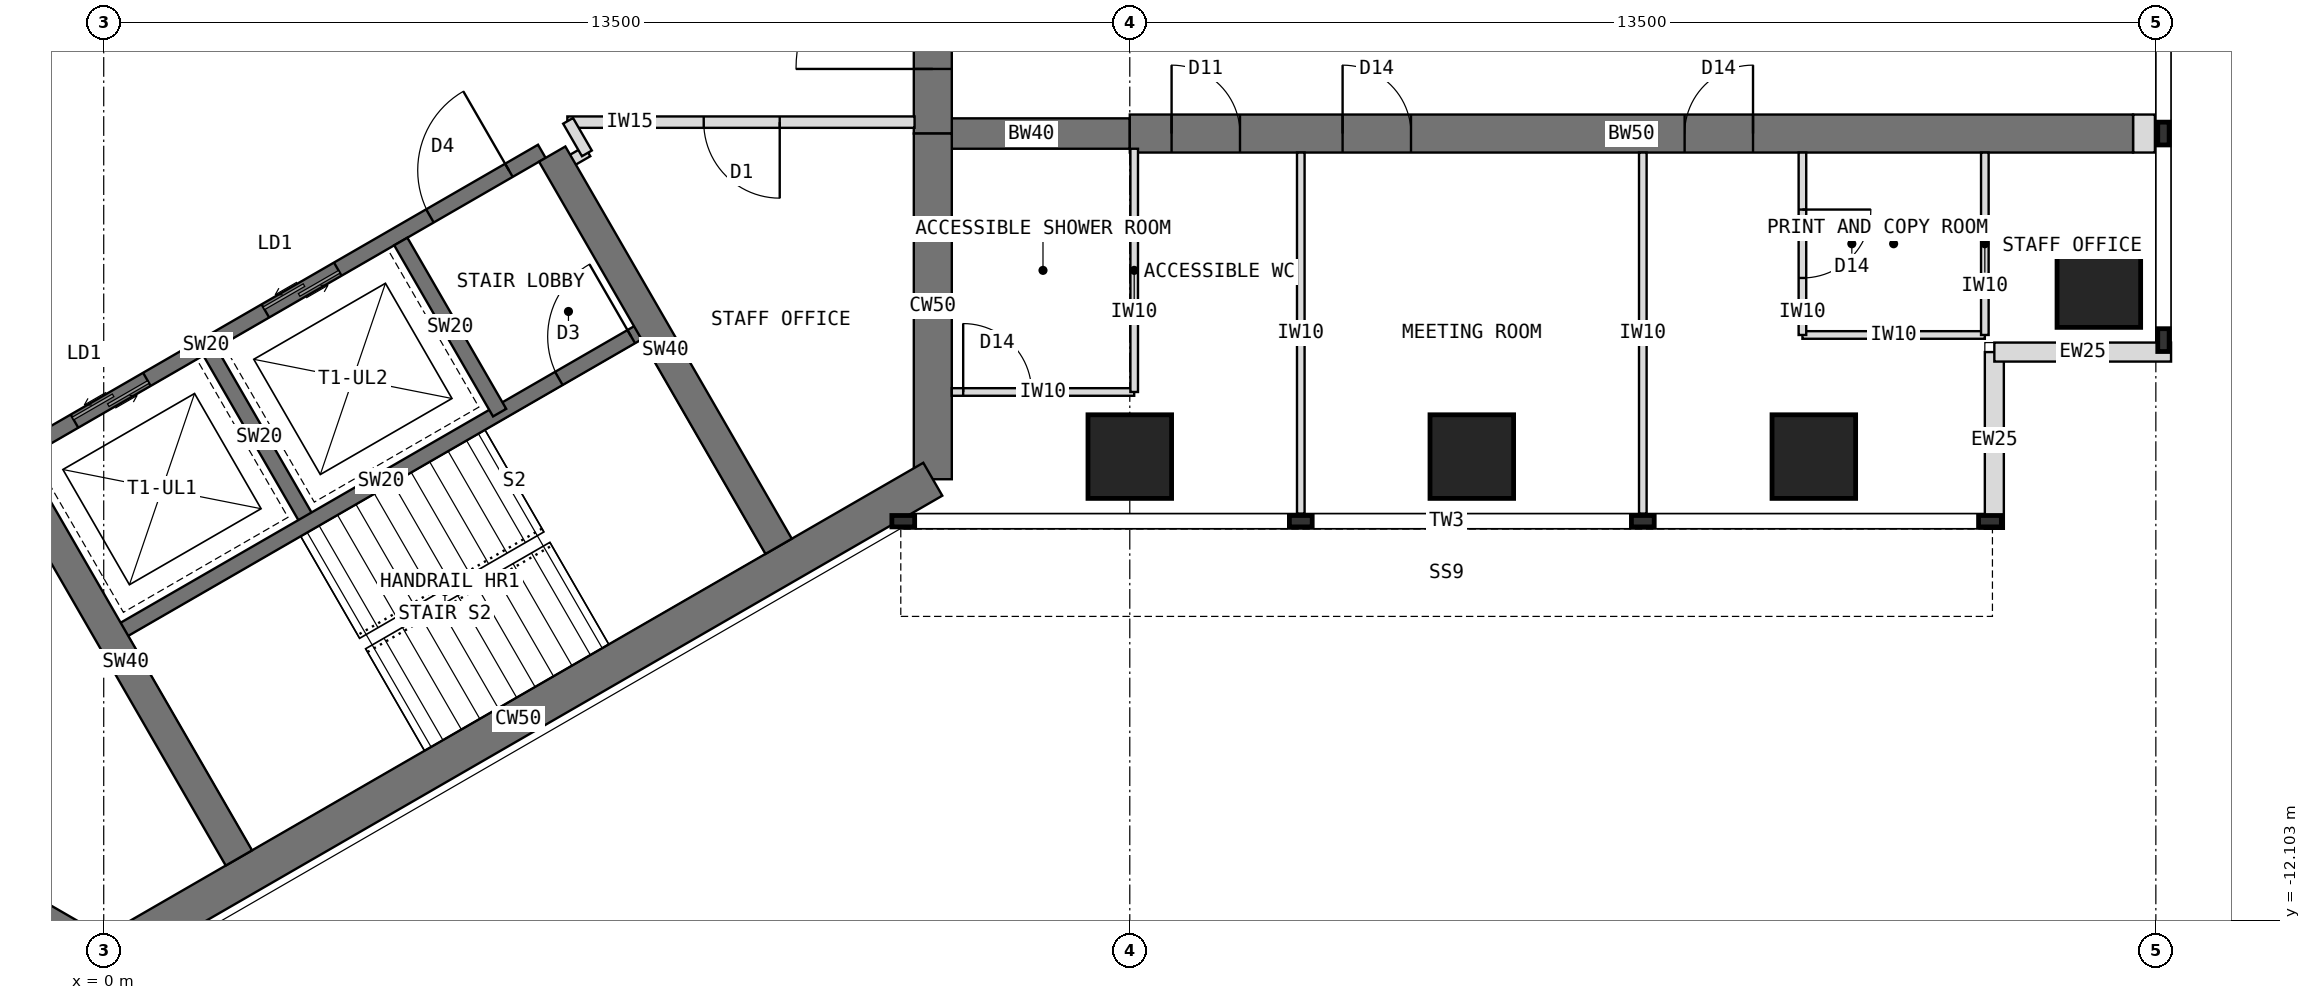
"""IFC4 building model, lengths in metres.
Left out: names, types, materials, properties, quantities, classifications, styles, units other than length and angle.
Written with IfcOpenShell. Run it as: python <this file> out.ifc"""

import sys

from ifc_helpers import new_model, si_unit, direction, frame, frame_2d, origin, origin_2d, place, context, subcontext, project, spatial, rectangle, extrude, element, fill, save


model = new_model("IFC4")
c1 = context("Model", 3, precision=1e-05, world=origin(), true_north=direction((0.0, 1.0)))
c2 = subcontext(c1, "Body", "Model", "MODEL_VIEW")
j1 = project(units=[si_unit("LENGTHUNIT", "METRE"), si_unit("PLANEANGLEUNIT", "RADIAN")], contexts=[c1])
p1 = place(None, origin())
s1 = spatial("IfcSite", under=j1, at=p1, CompositionType="ELEMENT")
p2 = place(p1, origin())
s2 = spatial("IfcBuilding", under=s1, at=p2, CompositionType="ELEMENT")
p3 = place(p2, frame((0.0, 0.0, 218.5)))
s3 = spatial("IfcBuildingStorey", under=s2, at=p3, CompositionType="ELEMENT", Elevation=218.5)
p4 = place(p3, frame((10.908, -6.298, 0.0), z_axis=(0.0, 0.0, 1.0), x_axis=(0.0, 1.0, 0.0)))
e1 = element("IfcWall", 1, at=p4, inside=s3, PredefinedType="SHEAR", context=c2, shape_type="SweptSolid", body=[
    extrude(rectangle(XDim=4.548, YDim=0.5, at=frame_2d((2.274, 0.0))), origin(), (0.0, 0.0, 1.0), 4.0),
])
p5 = place(p3, frame((10.908, -1.75, 0.0), z_axis=(0.0, 0.0, 1.0), x_axis=(0.0, 1.0, 0.0)))
e2 = element("IfcWall", 2, at=p5, inside=s3, PredefinedType="SHEAR", context=c2, shape_type="SweptSolid", body=[
    extrude(rectangle(XDim=3.5, YDim=0.5, at=frame_2d((1.75, 0.0))), origin(), (0.0, 0.0, 1.0), 4.0),
])
p6 = place(p5, frame((0.85, 0.0, 0.0)))
e3 = element("IfcOpeningElement", 3, at=p6, cuts=e2, PredefinedType="OPENING", context=c2, shape_type="SweptSolid", body=[
    extrude(rectangle(XDim=1.8, YDim=2.1, at=frame_2d((0.9, 1.05))), frame((0.0, 0.26, 0.0), z_axis=(0.0, -1.0, 0.0), x_axis=(1.0, 0.0, 0.0)), (0.0, 0.0, 1.0), 0.52),
])
p7 = place(p3, frame((-3.939, -10.322, 0.0), z_axis=(0.0, 0.0, 1.0), x_axis=(0.866011268655, -0.500024481964, 0.0)))
e4 = element("IfcWall", 4, at=p7, inside=s3, PredefinedType="SHEAR", context=c2, shape_type="SweptSolid", body=[
    extrude(rectangle(XDim=4.548, YDim=0.5, at=frame_2d((2.274, 0.0))), origin(), (0.0, 0.0, 1.0), 4.0),
])
p8 = place(p3, frame((0.0, -12.596, 0.0), z_axis=(0.0, 0.0, 1.0), x_axis=(0.866021940709, 0.500005998175, 0.0)))
e5 = element("IfcWall", 5, at=p8, inside=s3, PredefinedType="SHEAR", context=c2, shape_type="SweptSolid", body=[
    extrude(rectangle(XDim=12.596, YDim=0.5, at=frame_2d((6.298, 0.0))), origin(), (0.0, 0.0, 1.0), 4.0),
])
p9 = place(p3, frame((10.908, -1.75, 0.0), z_axis=(0.0, 0.0, 1.0), x_axis=(1.0, 0.0, 0.0)))
e6 = element("IfcWall", 6, at=p9, inside=s3, PredefinedType="SHEAR", context=c2, shape_type="SweptSolid", body=[
    extrude(rectangle(XDim=2.592, YDim=0.4, at=frame_2d((1.296, 0.0))), origin(), (0.0, 0.0, 1.0), 4.0),
])
p10 = place(p3, frame((13.5, -1.75, 0.0), z_axis=(0.0, 0.0, 1.0), x_axis=(1.0, 0.0, 0.0)))
e7 = element("IfcWall", 7, at=p10, inside=s3, PredefinedType="SHEAR", context=c2, shape_type="SweptSolid", body=[
    extrude(rectangle(XDim=13.2, YDim=0.5, at=frame_2d((6.6, 0.0))), origin(), (0.0, 0.0, 1.0), 4.0),
])
p11 = place(p10, frame((0.55, 0.0, 0.0)))
e8 = element("IfcOpeningElement", 8, at=p11, cuts=e7, PredefinedType="OPENING", context=c2, shape_type="SweptSolid", body=[
    extrude(rectangle(XDim=0.9, YDim=2.1, at=frame_2d((0.45, 1.05))), frame((0.0, 0.26, 0.0), z_axis=(0.0, -1.0, 0.0), x_axis=(1.0, 0.0, 0.0)), (0.0, 0.0, 1.0), 0.52),
])
p12 = place(p10, frame((2.8, 0.0, 0.0)))
e9 = element("IfcOpeningElement", 9, at=p12, cuts=e7, PredefinedType="OPENING", context=c2, shape_type="SweptSolid", body=[
    extrude(rectangle(XDim=0.9, YDim=2.1, at=frame_2d((0.45, 1.05))), frame((0.0, 0.26, 0.0), z_axis=(0.0, -1.0, 0.0), x_axis=(1.0, 0.0, 0.0)), (0.0, 0.0, 1.0), 0.52),
])
p13 = place(p10, frame((7.3, 0.0, 0.0)))
e10 = element("IfcOpeningElement", 10, at=p13, cuts=e7, PredefinedType="OPENING", context=c2, shape_type="SweptSolid", body=[
    extrude(rectangle(XDim=0.9, YDim=2.1, at=frame_2d((0.45, 1.05))), frame((0.0, 0.26, 0.0), z_axis=(0.0, -1.0, 0.0), x_axis=(1.0, 0.0, 0.0)), (0.0, 0.0, 1.0), 0.52),
])
for number, where, z_axis, x_axis in (
    (11, (13.5, -6.0, 0.0), (0.0, 0.0, 1.0), (1.0, 0.0, 0.0)),
    (12, (18.0, -6.0, 0.0), (0.0, 0.0, 1.0), (1.0, 0.0, 0.0)),
    (13, (22.5, -6.0, 0.0), (0.0, 0.0, 1.0), (1.0, 0.0, 0.0)),
    (14, (26.25, -3.75, 0.0), (0.0, 0.0, 1.0), (1.0, 0.0, 0.0)),
):
    element("IfcColumn", number, at=place(p3, frame(where, z_axis=z_axis, x_axis=x_axis)), inside=s3, PredefinedType="COLUMN", context=c2, shape_type="SweptSolid", body=[
        extrude(rectangle(XDim=1.1, YDim=1.1, at=origin_2d()), origin(), (0.0, 0.0, 1.0), 4.0),
    ])
for number, where, z_axis, x_axis in (
    (15, (24.875, -6.95, 0.0), (0.0, 0.0, 1.0), (0.0, 1.0, 0.0)),
    (16, (24.875, -4.625, 0.0), (0.0, 0.0, 1.0), (1.0, 0.0, 0.0)),
):
    element("IfcWall", number, at=place(p3, frame(where, z_axis=z_axis, x_axis=x_axis)), inside=s3, PredefinedType="STANDARD", context=c2, shape_type="SweptSolid", body=[
        extrude(rectangle(XDim=2.325, YDim=0.25, at=frame_2d((1.163, 0.0))), origin(), (0.0, 0.0, 1.0), 3.8),
    ])
p14 = place(p3, frame((26.7, -1.75, 0.0), z_axis=(0.0, 0.0, 1.0), x_axis=(1.0, 0.0, 0.0)))
e17 = element("IfcWall", 17, at=p14, inside=s3, PredefinedType="PARTITIONING", context=c2, shape_type="SweptSolid", body=[
    extrude(rectangle(XDim=0.288, YDim=0.5, at=frame_2d((0.144, 0.0))), origin(), (0.0, 0.0, 1.0), 3.8),
])
p15 = place(p3, frame((-1.164, -5.984, 0.0), z_axis=(0.0, 0.0, 1.0), x_axis=(0.866026010844, 0.49999894854, 0.0)))
e18 = element("IfcWall", 18, at=p15, inside=s3, PredefinedType="SHEAR", context=c2, shape_type="SweptSolid", body=[
    extrude(rectangle(XDim=8.0, YDim=0.2, at=frame_2d((4.0, 0.0))), origin(), (0.0, 0.0, 1.0), 4.0),
])
p16 = place(p15, frame((6.3, 0.0, 0.0)))
e19 = element("IfcOpeningElement", 19, at=p16, cuts=e18, PredefinedType="OPENING", context=c2, shape_type="SweptSolid", body=[
    extrude(rectangle(XDim=1.2, YDim=2.1, at=frame_2d((0.6, 1.05))), frame((0.0, 0.11, 0.0), z_axis=(0.0, -1.0, 0.0), x_axis=(1.0, 0.0, 0.0)), (0.0, 0.0, 1.0), 0.22),
])
p17 = place(p15, frame((0.9, 0.0, 0.0)))
e20 = element("IfcOpeningElement", 20, at=p17, cuts=e18, PredefinedType="OPENING", context=c2, shape_type="SweptSolid", body=[
    extrude(rectangle(XDim=1.1, YDim=2.2, at=frame_2d((0.55, 1.1))), frame((0.0, 0.11, 0.0), z_axis=(0.0, -1.0, 0.0), x_axis=(1.0, 0.0, 0.0)), (0.0, 0.0, 1.0), 0.22),
])
p18 = place(p15, frame((3.8, 0.0, 0.0)))
e21 = element("IfcOpeningElement", 21, at=p18, cuts=e18, PredefinedType="OPENING", context=c2, shape_type="SweptSolid", body=[
    extrude(rectangle(XDim=1.1, YDim=2.2, at=frame_2d((0.55, 1.1))), frame((0.0, 0.11, 0.0), z_axis=(0.0, -1.0, 0.0), x_axis=(1.0, 0.0, 0.0)), (0.0, 0.0, 1.0), 0.22),
])
p19 = place(p3, frame((1.397, -4.62, 0.0), z_axis=(0.0, 0.0, 1.0), x_axis=(0.499936506574, -0.866062058628, 0.0)))
e22 = element("IfcWall", 22, at=p19, inside=s3, PredefinedType="SHEAR", context=c2, shape_type="SweptSolid", body=[
    extrude(rectangle(XDim=2.6, YDim=0.2, at=frame_2d((1.3, 0.0))), origin(), (0.0, 0.0, 1.0), 4.0),
])
p20 = place(p3, frame((3.909, -3.17, 0.0), z_axis=(0.0, 0.0, 1.0), x_axis=(0.49997716683, -0.86603858612, 0.0)))
e23 = element("IfcWall", 23, at=p20, inside=s3, PredefinedType="SHEAR", context=c2, shape_type="SweptSolid", body=[
    extrude(rectangle(XDim=2.6, YDim=0.2, at=frame_2d((1.3, 0.0))), origin(), (0.0, 0.0, 1.0), 4.0),
])
p21 = place(p3, frame((0.186, -8.322, 0.0), z_axis=(0.0, 0.0, 1.0), x_axis=(0.866026010844, 0.49999894854, 0.0)))
e24 = element("IfcWall", 24, at=p21, inside=s3, PredefinedType="SHEAR", context=c2, shape_type="SweptSolid", body=[
    extrude(rectangle(XDim=8.0, YDim=0.2, at=frame_2d((4.0, 0.0))), origin(), (0.0, 0.0, 1.0), 4.0),
])
p22 = place(p21, frame((6.7, 0.0, 0.0)))
e25 = element("IfcOpeningElement", 25, at=p22, cuts=e24, PredefinedType="OPENING", context=c2, shape_type="SweptSolid", body=[
    extrude(rectangle(XDim=1.1, YDim=2.1, at=frame_2d((0.55, 1.05))), frame((0.0, 0.11, 0.0), z_axis=(0.0, -1.0, 0.0), x_axis=(1.0, 0.0, 0.0)), (0.0, 0.0, 1.0), 0.22),
])
p23 = place(p3, frame((5.901, -2.02, 0.0), z_axis=(0.0, 0.0, 1.0), x_axis=(0.500003832394, -0.86602319114, 0.0)))
e26 = element("IfcWall", 26, at=p23, inside=s3, PredefinedType="SHEAR", context=c2, shape_type="SweptSolid", body=[
    extrude(rectangle(XDim=5.958, YDim=0.4, at=frame_2d((2.979, 0.0))), origin(), (0.0, 0.0, 1.0), 4.0),
])
p24 = place(p3, frame((-1.201, -6.12, 0.0), z_axis=(0.0, 0.0, 1.0), x_axis=(0.500021575205, -0.866012946976, 0.0)))
e27 = element("IfcWall", 27, at=p24, inside=s3, PredefinedType="SHEAR", context=c2, shape_type="SweptSolid", body=[
    extrude(rectangle(XDim=5.958, YDim=0.4, at=frame_2d((2.979, 0.0))), origin(), (0.0, 0.0, 1.0), 4.0),
])
for number, where, z_axis, x_axis in (
    (28, (15.75, -2.0, 0.0), (0.0, 0.0, 1.0), (0.0, -1.0, 0.0)),
    (29, (20.25, -2.0, 0.0), (0.0, 0.0, 1.0), (0.0, -1.0, 0.0)),
):
    element("IfcWall", number, at=place(p3, frame(where, z_axis=z_axis, x_axis=x_axis)), inside=s3, PredefinedType="PARTITIONING", context=c2, shape_type="SweptSolid", body=[
        extrude(rectangle(XDim=4.75, YDim=0.1, at=frame_2d((2.375, 0.0))), origin(), (0.0, 0.0, 1.0), 3.8),
    ])
p25 = place(p3, frame((22.35, -4.4, 0.0), z_axis=(0.0, 0.0, 1.0), x_axis=(1.0, 0.0, 0.0)))
e30 = element("IfcWall", 30, at=p25, inside=s3, PredefinedType="PARTITIONING", context=c2, shape_type="SweptSolid", body=[
    extrude(rectangle(XDim=2.4, YDim=0.1, at=frame_2d((1.2, 0.0))), origin(), (0.0, 0.0, 1.0), 3.8),
])
p26 = place(p3, frame((22.35, -2.0, 0.0), z_axis=(0.0, 0.0, 1.0), x_axis=(0.0, -1.0, 0.0)))
e31 = element("IfcWall", 31, at=p26, inside=s3, PredefinedType="PARTITIONING", context=c2, shape_type="SweptSolid", body=[
    extrude(rectangle(XDim=2.4, YDim=0.1, at=frame_2d((1.2, 0.0))), origin(), (0.0, 0.0, 1.0), 3.8),
])
p27 = place(p26, frame((0.75, 0.0, 0.0)))
e32 = element("IfcOpeningElement", 32, at=p27, cuts=e31, PredefinedType="OPENING", context=c2, shape_type="SweptSolid", body=[
    extrude(rectangle(XDim=0.9, YDim=2.1, at=frame_2d((0.45, 1.05))), frame((0.0, 0.06, 0.0), z_axis=(0.0, -1.0, 0.0), x_axis=(1.0, 0.0, 0.0)), (0.0, 0.0, 1.0), 0.12),
])
p28 = place(p3, frame((24.75, -2.0, 0.0), z_axis=(0.0, 0.0, 1.0), x_axis=(0.0, -1.0, 0.0)))
e33 = element("IfcWall", 33, at=p28, inside=s3, PredefinedType="PARTITIONING", context=c2, shape_type="SweptSolid", body=[
    extrude(rectangle(XDim=2.4, YDim=0.1, at=frame_2d((1.2, 0.0))), origin(), (0.0, 0.0, 1.0), 3.8),
])
p29 = place(p3, frame((11.158, -5.15, 0.0), z_axis=(0.0, 0.0, 1.0), x_axis=(1.0, 0.0, 0.0)))
e34 = element("IfcWall", 34, at=p29, inside=s3, PredefinedType="PARTITIONING", context=c2, shape_type="SweptSolid", body=[
    extrude(rectangle(XDim=2.4, YDim=0.1, at=frame_2d((1.2, 0.0))), origin(), (0.0, 0.0, 1.0), 3.8),
])
p30 = place(p29, frame((0.15, 0.0, 0.0)))
e35 = element("IfcOpeningElement", 35, at=p30, cuts=e34, PredefinedType="OPENING", context=c2, shape_type="SweptSolid", body=[
    extrude(rectangle(XDim=0.9, YDim=2.1, at=frame_2d((0.45, 1.05))), frame((0.0, 0.06, 0.0), z_axis=(0.0, -1.0, 0.0), x_axis=(1.0, 0.0, 0.0)), (0.0, 0.0, 1.0), 0.12),
])
p31 = place(p3, frame((13.558, -1.95, 0.0), z_axis=(0.0, 0.0, 1.0), x_axis=(0.0, -1.0, 0.0)))
e36 = element("IfcWall", 36, at=p31, inside=s3, PredefinedType="PARTITIONING", context=c2, shape_type="SweptSolid", body=[
    extrude(rectangle(XDim=3.2, YDim=0.1, at=frame_2d((1.6, 0.0))), origin(), (0.0, 0.0, 1.0), 3.267),
])
p32 = place(p3, frame((6.365, -1.983, 0.0), z_axis=(0.0, 0.0, 1.0), x_axis=(-0.865892400268, -0.500230298122, 0.0)))
e37 = element("IfcWall", 37, at=p32, inside=s3, PredefinedType="PARTITIONING", context=c2, shape_type="SweptSolid", body=[
    extrude(rectangle(XDim=0.43, YDim=0.15, at=frame_2d((0.215, 0.0))), origin(), (0.0, 0.0, 1.0), 3.8),
])
p33 = place(p3, frame((10.668, -1.6, 0.0), z_axis=(0.0, 0.0, 1.0), x_axis=(-1.0, 0.0, 0.0)))
e38 = element("IfcWall", 38, at=p33, inside=s3, PredefinedType="PARTITIONING", context=c2, shape_type="SweptSolid", body=[
    extrude(rectangle(XDim=4.568, YDim=0.15, at=frame_2d((2.284, 0.0))), origin(), (0.0, 0.0, 1.0), 3.8),
])
p34 = place(p33, frame((1.774, 0.0, 0.0)))
e39 = element("IfcOpeningElement", 39, at=p34, cuts=e38, PredefinedType="OPENING", context=c2, shape_type="SweptSolid", body=[
    extrude(rectangle(XDim=1.0, YDim=2.1, at=frame_2d((0.5, 1.05))), frame((0.0, 0.085, 0.0), z_axis=(0.0, -1.0, 0.0), x_axis=(1.0, 0.0, 0.0)), (0.0, 0.0, 1.0), 0.17),
])
p35 = place(p3, frame((6.11, -1.583, 0.0), z_axis=(0.0, 0.0, 1.0), x_axis=(0.50033519877, -0.865831790172, 0.0)))
e40 = element("IfcWall", 40, at=p35, inside=s3, PredefinedType="PARTITIONING", context=c2, shape_type="SweptSolid", body=[
    extrude(rectangle(XDim=0.494, YDim=0.15, at=frame_2d((0.247, 0.0))), origin(), (0.0, 0.0, 1.0), 3.8),
])
p36 = place(p16, origin())
e41 = element("IfcDoor", 41, at=p36, inside=s3, OperationType="SINGLE_SWING_RIGHT", PredefinedType="DOOR", context=c2, shape_type="SweptSolid", body=[
    extrude(rectangle(XDim=1.2, YDim=2.1, at=frame_2d((0.6, 1.05))), frame((0.0, 0.025, 0.0), z_axis=(0.0, -1.0, 0.0), x_axis=(1.0, 0.0, 0.0)), (0.0, 0.0, 1.0), 0.05),
])
fill(e19, e41)
p37 = place(p17, origin())
e42 = element("IfcDoor", 42, at=p37, inside=s3, OperationType="DOUBLE_DOOR_SLIDING", PredefinedType="DOOR", context=c2, shape_type="SweptSolid", body=[
    extrude(rectangle(XDim=1.1, YDim=2.2, at=frame_2d((0.55, 1.1))), frame((0.0, 0.025, 0.0), z_axis=(0.0, -1.0, 0.0), x_axis=(1.0, 0.0, 0.0)), (0.0, 0.0, 1.0), 0.05),
])
fill(e20, e42)
p38 = place(p18, origin())
e43 = element("IfcDoor", 43, at=p38, inside=s3, OperationType="DOUBLE_DOOR_SLIDING", PredefinedType="DOOR", context=c2, shape_type="SweptSolid", body=[
    extrude(rectangle(XDim=1.1, YDim=2.2, at=frame_2d((0.55, 1.1))), frame((0.0, 0.025, 0.0), z_axis=(0.0, -1.0, 0.0), x_axis=(1.0, 0.0, 0.0)), (0.0, 0.0, 1.0), 0.05),
])
fill(e21, e43)
p39 = place(p22, origin())
e44 = element("IfcDoor", 44, at=p39, inside=s3, OperationType="SINGLE_SWING_RIGHT", PredefinedType="DOOR", context=c2, shape_type="SweptSolid", body=[
    extrude(rectangle(XDim=1.1, YDim=2.1, at=frame_2d((0.55, 1.05))), frame((0.0, 0.025, 0.0), z_axis=(0.0, -1.0, 0.0), x_axis=(1.0, 0.0, 0.0)), (0.0, 0.0, 1.0), 0.05),
])
fill(e25, e44)
p40 = place(p6, origin())
e45 = element("IfcDoor", 45, at=p40, inside=s3, OperationType="DOUBLE_DOOR_DOUBLE_SWING", PredefinedType="DOOR", context=c2, shape_type="SweptSolid", body=[
    extrude(rectangle(XDim=1.8, YDim=2.1, at=frame_2d((0.9, 1.05))), frame((0.0, 0.025, 0.0), z_axis=(0.0, -1.0, 0.0), x_axis=(1.0, 0.0, 0.0)), (0.0, 0.0, 1.0), 0.05),
])
fill(e3, e45)
p41 = place(p27, origin())
e46 = element("IfcDoor", 46, at=p41, inside=s3, OperationType="SINGLE_SWING_LEFT", PredefinedType="DOOR", context=c2, shape_type="SweptSolid", body=[
    extrude(rectangle(XDim=0.9, YDim=2.1, at=frame_2d((0.45, 1.05))), frame((0.0, 0.025, 0.0), z_axis=(0.0, -1.0, 0.0), x_axis=(1.0, 0.0, 0.0)), (0.0, 0.0, 1.0), 0.05),
])
fill(e32, e46)
p42 = place(p30, origin())
e47 = element("IfcDoor", 47, at=p42, inside=s3, OperationType="SINGLE_SWING_LEFT", PredefinedType="DOOR", context=c2, shape_type="SweptSolid", body=[
    extrude(rectangle(XDim=0.9, YDim=2.1, at=frame_2d((0.45, 1.05))), frame((0.0, 0.025, 0.0), z_axis=(0.0, -1.0, 0.0), x_axis=(1.0, 0.0, 0.0)), (0.0, 0.0, 1.0), 0.05),
])
fill(e35, e47)
p43 = place(p34, origin())
e48 = element("IfcDoor", 48, at=p43, inside=s3, OperationType="SINGLE_SWING_LEFT", PredefinedType="DOOR", context=c2, shape_type="SweptSolid", body=[
    extrude(rectangle(XDim=1.0, YDim=2.1, at=frame_2d((0.5, 1.05))), frame((0.0, 0.025, 0.0), z_axis=(0.0, -1.0, 0.0), x_axis=(1.0, 0.0, 0.0)), (0.0, 0.0, 1.0), 0.05),
])
fill(e39, e48)
p44 = place(p11, origin())
e49 = element("IfcDoor", 49, at=p44, inside=s3, OperationType="SINGLE_SWING_LEFT", PredefinedType="DOOR", context=c2, shape_type="SweptSolid", body=[
    extrude(rectangle(XDim=0.9, YDim=2.1, at=frame_2d((0.45, 1.05))), frame((0.0, 0.025, 0.0), z_axis=(0.0, -1.0, 0.0), x_axis=(1.0, 0.0, 0.0)), (0.0, 0.0, 1.0), 0.05),
])
fill(e8, e49)
p45 = place(p12, origin())
e50 = element("IfcDoor", 50, at=p45, inside=s3, OperationType="SINGLE_SWING_LEFT", PredefinedType="DOOR", context=c2, shape_type="SweptSolid", body=[
    extrude(rectangle(XDim=0.9, YDim=2.1, at=frame_2d((0.45, 1.05))), frame((0.0, 0.025, 0.0), z_axis=(0.0, -1.0, 0.0), x_axis=(1.0, 0.0, 0.0)), (0.0, 0.0, 1.0), 0.05),
])
fill(e9, e50)
p46 = place(p13, origin())
e51 = element("IfcDoor", 51, at=p46, inside=s3, OperationType="SINGLE_SWING_RIGHT", PredefinedType="DOOR", context=c2, shape_type="SweptSolid", body=[
    extrude(rectangle(XDim=0.9, YDim=2.1, at=frame_2d((0.45, 1.05))), frame((0.0, 0.025, 0.0), z_axis=(0.0, -1.0, 0.0), x_axis=(1.0, 0.0, 0.0)), (0.0, 0.0, 1.0), 0.05),
])
fill(e10, e51)
save(model, sys.argv[1])
